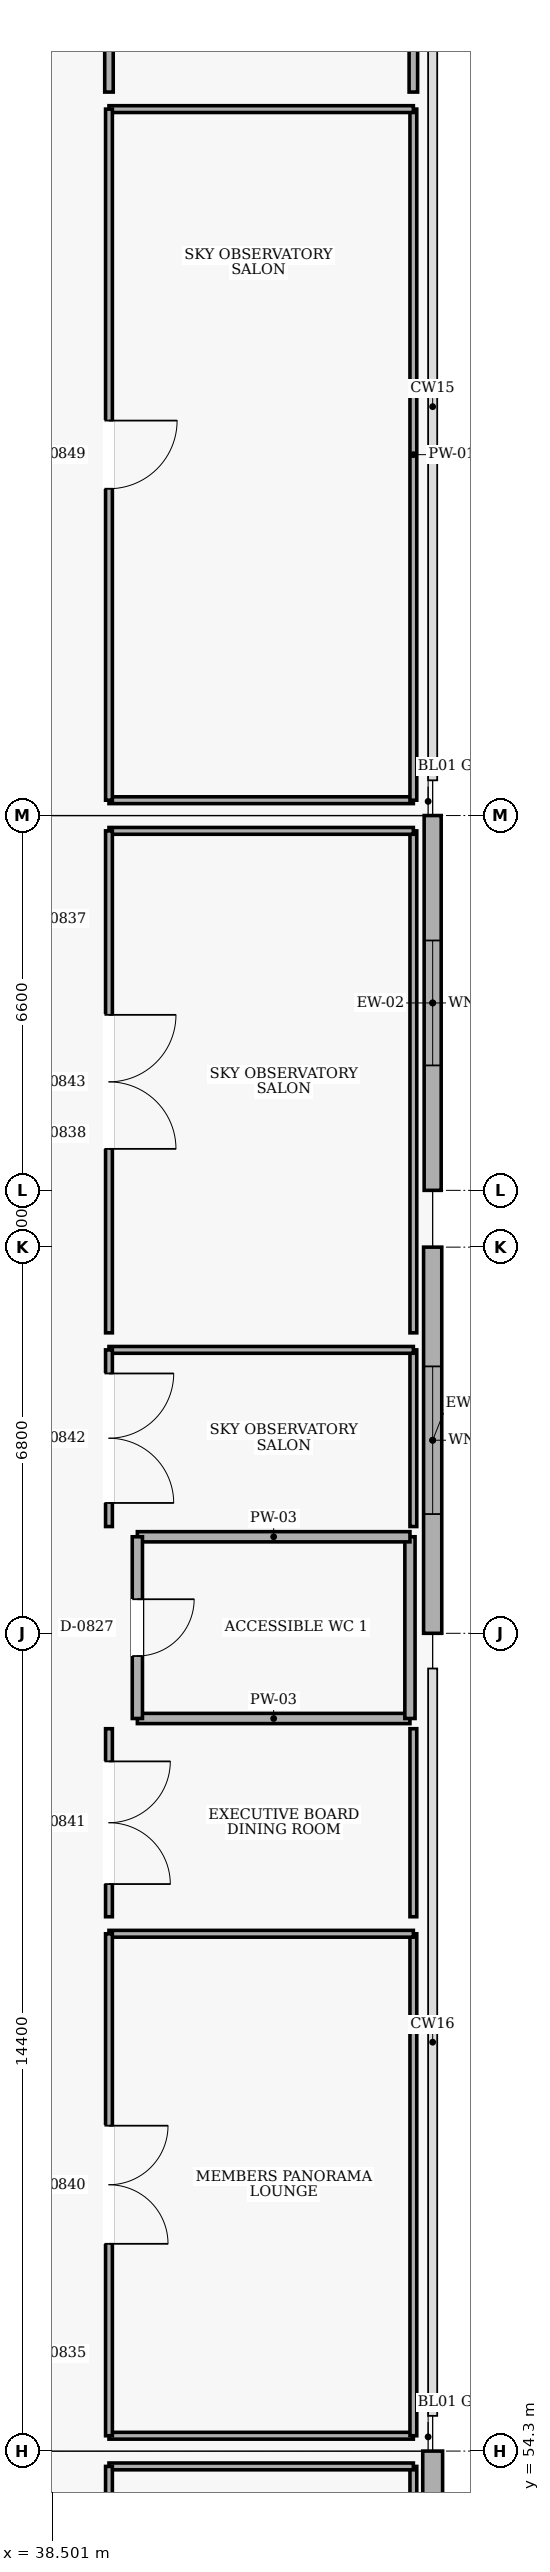
"""IFC4 building model, lengths in metres.
Left out: names, types, materials, properties, quantities, classifications, styles, units other than length and angle.
Written with IfcOpenShell. Run it as: python <this file> out.ifc"""

import sys

from ifc_helpers import new_model, si_unit, direction, frame, frame_2d, origin, place, context, subcontext, project, spatial, rectangle, extrude, element, fill, save


model = new_model("IFC4")
c1 = context("Model", 3, precision=1e-05, world=origin(), true_north=direction((0.0, 1.0)))
c2 = subcontext(c1, "Body", "Model", "MODEL_VIEW")
j1 = project(units=[si_unit("LENGTHUNIT", "METRE"), si_unit("PLANEANGLEUNIT", "RADIAN")], contexts=[c1])
p1 = place(None, origin())
s1 = spatial("IfcSite", under=j1, at=p1, CompositionType="ELEMENT")
p2 = place(p1, origin())
s2 = spatial("IfcBuilding", under=s1, at=p2, CompositionType="ELEMENT")
p3 = place(p2, frame((0.0, 0.0, 29.4)))
s3 = spatial("IfcBuildingStorey", under=s2, at=p3, CompositionType="ELEMENT", Elevation=29.4)
p4 = place(p3, frame((45.2, 83.1, 0.0), z_axis=(0.0, 0.0, 1.0), x_axis=(0.0, -1.0, 0.0)))
e1 = element("IfcWall", 1, at=p4, inside=s3, PredefinedType="SOLIDWALL", context=c2, shape_type="SweptSolid", body=[
    extrude(rectangle(XDim=6.6, YDim=0.3, at=frame_2d((3.3, 0.0))), origin(), (0.0, 0.0, 1.0), 4.48),
])
p5 = place(p4, frame((2.2, 0.0, 0.9)))
e2 = element("IfcOpeningElement", 2, at=p5, cuts=e1, PredefinedType="OPENING", context=c2, shape_type="SweptSolid", body=[
    extrude(rectangle(XDim=2.2, YDim=2.1, at=frame_2d((1.1, 1.05))), frame((0.0, 0.16, 0.0), z_axis=(0.0, -1.0, 0.0), x_axis=(1.0, 0.0, 0.0)), (0.0, 0.0, 1.0), 0.32),
])
p6 = place(p3, frame((45.2, 75.5, 0.0), z_axis=(0.0, 0.0, 1.0), x_axis=(0.0, -1.0, 0.0)))
e3 = element("IfcWall", 3, at=p6, inside=s3, PredefinedType="SOLIDWALL", context=c2, shape_type="SweptSolid", body=[
    extrude(rectangle(XDim=6.8, YDim=0.32, at=frame_2d((3.4, 0.0))), origin(), (0.0, 0.0, 1.0), 4.48),
])
p7 = place(p6, frame((2.1, 0.0, 0.9)))
e4 = element("IfcOpeningElement", 4, at=p7, cuts=e3, PredefinedType="OPENING", context=c2, shape_type="SweptSolid", body=[
    extrude(rectangle(XDim=2.6, YDim=2.1, at=frame_2d((1.3, 1.05))), frame((0.0, 0.17, 0.0), z_axis=(0.0, -1.0, 0.0), x_axis=(1.0, 0.0, 0.0)), (0.0, 0.0, 1.0), 0.34),
])
p8 = place(p3, frame((45.2, 54.3, 0.0), z_axis=(0.0, 0.0, 1.0), x_axis=(0.0, -1.0, 0.0)))
e5 = element("IfcWall", 5, at=p8, inside=s3, PredefinedType="SOLIDWALL", context=c2, shape_type="SweptSolid", body=[
    extrude(rectangle(XDim=7.2, YDim=0.35, at=frame_2d((3.6, 0.0))), origin(), (0.0, 0.0, 1.0), 4.48),
])
p9 = place(p8, frame((2.1, 0.0, 0.9)))
e6 = element("IfcOpeningElement", 6, at=p9, cuts=e5, PredefinedType="OPENING", context=c2, shape_type="SweptSolid", body=[
    extrude(rectangle(XDim=3.0, YDim=2.1, at=frame_2d((1.5, 1.05))), frame((0.0, 0.185, 0.0), z_axis=(0.0, -1.0, 0.0), x_axis=(1.0, 0.0, 0.0)), (0.0, 0.0, 1.0), 0.37),
])
p10 = place(p3, frame((40.0, 67.2, 0.0), z_axis=(0.0, 0.0, 1.0), x_axis=(1.0, 0.0, 0.0)))
e7 = element("IfcWall", 7, at=p10, inside=s3, PredefinedType="PARTITIONING", context=c2, shape_type="SweptSolid", body=[
    extrude(rectangle(XDim=4.8, YDim=0.18, at=frame_2d((2.4, 0.0))), origin(), (0.0, 0.0, 1.0), 4.5),
])
p11 = place(p3, frame((44.8, 67.2, 0.0), z_axis=(0.0, 0.0, 1.0), x_axis=(0.0, 1.0, 0.0)))
e8 = element("IfcWall", 8, at=p11, inside=s3, PredefinedType="PARTITIONING", context=c2, shape_type="SweptSolid", body=[
    extrude(rectangle(XDim=3.2, YDim=0.18, at=frame_2d((1.6, 0.0))), origin(), (0.0, 0.0, 1.0), 4.5),
])
p12 = place(p3, frame((44.8, 70.4, 0.0), z_axis=(0.0, 0.0, 1.0), x_axis=(-1.0, 0.0, 0.0)))
e9 = element("IfcWall", 9, at=p12, inside=s3, PredefinedType="PARTITIONING", context=c2, shape_type="SweptSolid", body=[
    extrude(rectangle(XDim=4.8, YDim=0.18, at=frame_2d((2.4, 0.0))), origin(), (0.0, 0.0, 1.0), 4.5),
])
p13 = place(p3, frame((40.0, 70.4, 0.0), z_axis=(0.0, 0.0, 1.0), x_axis=(0.0, -1.0, 0.0)))
e10 = element("IfcWall", 10, at=p13, inside=s3, PredefinedType="PARTITIONING", context=c2, shape_type="SweptSolid", body=[
    extrude(rectangle(XDim=3.2, YDim=0.18, at=frame_2d((1.6, 0.0))), origin(), (0.0, 0.0, 1.0), 4.5),
])
p14 = place(p13, frame((1.1, 0.0, 0.0)))
e11 = element("IfcOpeningElement", 11, at=p14, cuts=e10, PredefinedType="OPENING", context=c2, shape_type="SweptSolid", body=[
    extrude(rectangle(XDim=1.0, YDim=2.1, at=frame_2d((0.5, 1.05))), frame((0.0, 0.1, 0.0), z_axis=(0.0, -1.0, 0.0), x_axis=(1.0, 0.0, 0.0)), (0.0, 0.0, 1.0), 0.2),
])
p15 = place(p3, frame((44.86, 41.78, 0.0), z_axis=(0.0, 0.0, 1.0), x_axis=(0.0, 1.0, 0.0)))
e12 = element("IfcWall", 12, at=p15, inside=s3, PredefinedType="PARTITIONING", context=c2, shape_type="SweptSolid", body=[
    extrude(rectangle(XDim=12.25, YDim=0.12, at=frame_2d((6.125, 0.0))), origin(), (0.0, 0.0, 1.0), 4.5),
])
p16 = place(p3, frame((44.86, 54.03, 0.0), z_axis=(0.0, 0.0, 1.0), x_axis=(-1.0, 0.0, 0.0)))
e13 = element("IfcWall", 13, at=p16, inside=s3, PredefinedType="PARTITIONING", context=c2, shape_type="SweptSolid", body=[
    extrude(rectangle(XDim=5.36, YDim=0.12, at=frame_2d((2.68, 0.0))), origin(), (0.0, 0.0, 1.0), 4.5),
])
p17 = place(p3, frame((39.5, 54.03, 0.0), z_axis=(0.0, 0.0, 1.0), x_axis=(0.0, -1.0, 0.0)))
e14 = element("IfcWall", 14, at=p17, inside=s3, PredefinedType="PARTITIONING", context=c2, shape_type="SweptSolid", body=[
    extrude(rectangle(XDim=12.25, YDim=0.12, at=frame_2d((6.125, 0.0))), origin(), (0.0, 0.0, 1.0), 4.5),
])
p18 = place(p17, frame((5.425, 0.0, 0.0)))
e15 = element("IfcOpeningElement", 15, at=p18, cuts=e14, PredefinedType="OPENING", context=c2, shape_type="SweptSolid", body=[
    extrude(rectangle(XDim=1.4, YDim=2.2, at=frame_2d((0.7, 1.1))), frame((0.0, 0.07, 0.0), z_axis=(0.0, -1.0, 0.0), x_axis=(1.0, 0.0, 0.0)), (0.0, 0.0, 1.0), 0.14),
])
p19 = place(p3, frame((39.5, 54.57, 0.0), z_axis=(0.0, 0.0, 1.0), x_axis=(1.0, 0.0, 0.0)))
e16 = element("IfcWall", 16, at=p19, inside=s3, PredefinedType="PARTITIONING", context=c2, shape_type="SweptSolid", body=[
    extrude(rectangle(XDim=5.36, YDim=0.12, at=frame_2d((2.68, 0.0))), origin(), (0.0, 0.0, 1.0), 4.5),
])
p20 = place(p3, frame((44.86, 54.57, 0.0), z_axis=(0.0, 0.0, 1.0), x_axis=(0.0, 1.0, 0.0)))
e17 = element("IfcWall", 17, at=p20, inside=s3, PredefinedType="PARTITIONING", context=c2, shape_type="SweptSolid", body=[
    extrude(rectangle(XDim=8.839, YDim=0.12, at=frame_2d((4.419, 0.0))), origin(), (0.0, 0.0, 1.0), 4.5),
])
p21 = place(p3, frame((44.86, 63.409, 0.0), z_axis=(0.0, 0.0, 1.0), x_axis=(-1.0, 0.0, 0.0)))
e18 = element("IfcWall", 18, at=p21, inside=s3, PredefinedType="PARTITIONING", context=c2, shape_type="SweptSolid", body=[
    extrude(rectangle(XDim=5.36, YDim=0.12, at=frame_2d((2.68, 0.0))), origin(), (0.0, 0.0, 1.0), 4.5),
])
p22 = place(p3, frame((39.5, 63.409, 0.0), z_axis=(0.0, 0.0, 1.0), x_axis=(0.0, -1.0, 0.0)))
e19 = element("IfcWall", 19, at=p22, inside=s3, PredefinedType="PARTITIONING", context=c2, shape_type="SweptSolid", body=[
    extrude(rectangle(XDim=8.839, YDim=0.12, at=frame_2d((4.419, 0.0))), origin(), (0.0, 0.0, 1.0), 4.5),
])
p23 = place(p22, frame((3.38, 0.0, 0.0)))
e20 = element("IfcOpeningElement", 20, at=p23, cuts=e19, PredefinedType="OPENING", context=c2, shape_type="SweptSolid", body=[
    extrude(rectangle(XDim=2.08, YDim=2.35, at=frame_2d((1.04, 1.175))), frame((0.0, 0.07, 0.0), z_axis=(0.0, -1.0, 0.0), x_axis=(1.0, 0.0, 0.0)), (0.0, 0.0, 1.0), 0.14),
])
p24 = place(p3, frame((44.86, 63.709, 0.0), z_axis=(0.0, 0.0, 1.0), x_axis=(0.0, 1.0, 0.0)))
e21 = element("IfcWall", 21, at=p24, inside=s3, PredefinedType="PARTITIONING", context=c2, shape_type="SweptSolid", body=[
    extrude(rectangle(XDim=3.311, YDim=0.12, at=frame_2d((1.655, 0.0))), origin(), (0.0, 0.0, 1.0), 4.5),
])
p25 = place(p3, frame((39.5, 67.02, 0.0), z_axis=(0.0, 0.0, 1.0), x_axis=(0.0, -1.0, 0.0)))
e22 = element("IfcWall", 22, at=p25, inside=s3, PredefinedType="PARTITIONING", context=c2, shape_type="SweptSolid", body=[
    extrude(rectangle(XDim=3.311, YDim=0.12, at=frame_2d((1.655, 0.0))), origin(), (0.0, 0.0, 1.0), 4.5),
])
p26 = place(p25, frame((0.575, 0.0, 0.0)))
e23 = element("IfcOpeningElement", 23, at=p26, cuts=e22, PredefinedType="OPENING", context=c2, shape_type="SweptSolid", body=[
    extrude(rectangle(XDim=2.16, YDim=2.35, at=frame_2d((1.08, 1.175))), frame((0.0, 0.07, 0.0), z_axis=(0.0, -1.0, 0.0), x_axis=(1.0, 0.0, 0.0)), (0.0, 0.0, 1.0), 0.14),
])
p27 = place(p3, frame((44.86, 70.58, 0.0), z_axis=(0.0, 0.0, 1.0), x_axis=(0.0, 1.0, 0.0)))
e24 = element("IfcWall", 24, at=p27, inside=s3, PredefinedType="PARTITIONING", context=c2, shape_type="SweptSolid", body=[
    extrude(rectangle(XDim=3.111, YDim=0.12, at=frame_2d((1.555, 0.0))), origin(), (0.0, 0.0, 1.0), 4.5),
])
p28 = place(p3, frame((44.86, 73.691, 0.0), z_axis=(0.0, 0.0, 1.0), x_axis=(-1.0, 0.0, 0.0)))
e25 = element("IfcWall", 25, at=p28, inside=s3, PredefinedType="PARTITIONING", context=c2, shape_type="SweptSolid", body=[
    extrude(rectangle(XDim=5.36, YDim=0.12, at=frame_2d((2.68, 0.0))), origin(), (0.0, 0.0, 1.0), 4.5),
])
p29 = place(p3, frame((39.5, 73.691, 0.0), z_axis=(0.0, 0.0, 1.0), x_axis=(0.0, -1.0, 0.0)))
e26 = element("IfcWall", 26, at=p29, inside=s3, PredefinedType="PARTITIONING", context=c2, shape_type="SweptSolid", body=[
    extrude(rectangle(XDim=3.111, YDim=0.12, at=frame_2d((1.555, 0.0))), origin(), (0.0, 0.0, 1.0), 4.5),
])
p30 = place(p29, frame((0.415, 0.0, 0.0)))
e27 = element("IfcOpeningElement", 27, at=p30, cuts=e26, PredefinedType="OPENING", context=c2, shape_type="SweptSolid", body=[
    extrude(rectangle(XDim=2.28, YDim=2.4, at=frame_2d((1.14, 1.2))), frame((0.0, 0.07, 0.0), z_axis=(0.0, -1.0, 0.0), x_axis=(1.0, 0.0, 0.0)), (0.0, 0.0, 1.0), 0.14),
])
p31 = place(p3, frame((44.86, 73.991, 0.0), z_axis=(0.0, 0.0, 1.0), x_axis=(0.0, 1.0, 0.0)))
e28 = element("IfcWall", 28, at=p31, inside=s3, PredefinedType="PARTITIONING", context=c2, shape_type="SweptSolid", body=[
    extrude(rectangle(XDim=8.839, YDim=0.12, at=frame_2d((4.42, 0.0))), origin(), (0.0, 0.0, 1.0), 4.5),
])
p32 = place(p3, frame((44.86, 82.83, 0.0), z_axis=(0.0, 0.0, 1.0), x_axis=(-1.0, 0.0, 0.0)))
e29 = element("IfcWall", 29, at=p32, inside=s3, PredefinedType="PARTITIONING", context=c2, shape_type="SweptSolid", body=[
    extrude(rectangle(XDim=5.36, YDim=0.12, at=frame_2d((2.68, 0.0))), origin(), (0.0, 0.0, 1.0), 4.5),
])
p33 = place(p3, frame((39.5, 82.83, 0.0), z_axis=(0.0, 0.0, 1.0), x_axis=(0.0, -1.0, 0.0)))
e30 = element("IfcWall", 30, at=p33, inside=s3, PredefinedType="PARTITIONING", context=c2, shape_type="SweptSolid", body=[
    extrude(rectangle(XDim=8.839, YDim=0.12, at=frame_2d((4.42, 0.0))), origin(), (0.0, 0.0, 1.0), 4.5),
])
p34 = place(p33, frame((3.24, 0.0, 0.0)))
e31 = element("IfcOpeningElement", 31, at=p34, cuts=e30, PredefinedType="OPENING", context=c2, shape_type="SweptSolid", body=[
    extrude(rectangle(XDim=2.36, YDim=2.4, at=frame_2d((1.18, 1.2))), frame((0.0, 0.07, 0.0), z_axis=(0.0, -1.0, 0.0), x_axis=(1.0, 0.0, 0.0)), (0.0, 0.0, 1.0), 0.14),
])
p35 = place(p3, frame((39.5, 83.37, 0.0), z_axis=(0.0, 0.0, 1.0), x_axis=(1.0, 0.0, 0.0)))
e32 = element("IfcWall", 32, at=p35, inside=s3, PredefinedType="PARTITIONING", context=c2, shape_type="SweptSolid", body=[
    extrude(rectangle(XDim=5.36, YDim=0.12, at=frame_2d((2.68, 0.0))), origin(), (0.0, 0.0, 1.0), 4.5),
])
p36 = place(p3, frame((44.86, 83.37, 0.0), z_axis=(0.0, 0.0, 1.0), x_axis=(0.0, 1.0, 0.0)))
e33 = element("IfcWall", 33, at=p36, inside=s3, PredefinedType="PARTITIONING", context=c2, shape_type="SweptSolid", body=[
    extrude(rectangle(XDim=12.169, YDim=0.12, at=frame_2d((6.085, 0.0))), origin(), (0.0, 0.0, 1.0), 4.5),
])
p37 = place(p3, frame((44.86, 95.54, 0.0), z_axis=(0.0, 0.0, 1.0), x_axis=(-1.0, 0.0, 0.0)))
e34 = element("IfcWall", 34, at=p37, inside=s3, PredefinedType="PARTITIONING", context=c2, shape_type="SweptSolid", body=[
    extrude(rectangle(XDim=5.36, YDim=0.12, at=frame_2d((2.68, 0.0))), origin(), (0.0, 0.0, 1.0), 4.5),
])
p38 = place(p3, frame((39.5, 95.54, 0.0), z_axis=(0.0, 0.0, 1.0), x_axis=(0.0, -1.0, 0.0)))
e35 = element("IfcWall", 35, at=p38, inside=s3, PredefinedType="PARTITIONING", context=c2, shape_type="SweptSolid", body=[
    extrude(rectangle(XDim=12.169, YDim=0.12, at=frame_2d((6.085, 0.0))), origin(), (0.0, 0.0, 1.0), 4.5),
])
p39 = place(p38, frame((5.485, 0.0, 0.0)))
e36 = element("IfcOpeningElement", 36, at=p39, cuts=e35, PredefinedType="OPENING", context=c2, shape_type="SweptSolid", body=[
    extrude(rectangle(XDim=1.2, YDim=2.15, at=frame_2d((0.6, 1.075))), frame((0.0, 0.07, 0.0), z_axis=(0.0, -1.0, 0.0), x_axis=(1.0, 0.0, 0.0)), (0.0, 0.0, 1.0), 0.14),
])
p40 = place(p3, frame((44.86, 95.84, 0.0), z_axis=(0.0, 0.0, 1.0), x_axis=(0.0, 1.0, 0.0)))
e37 = element("IfcWall", 37, at=p40, inside=s3, PredefinedType="PARTITIONING", context=c2, shape_type="SweptSolid", body=[
    extrude(rectangle(XDim=15.57, YDim=0.15, at=frame_2d((7.785, 0.0))), origin(), (0.0, 0.0, 1.0), 4.5),
])
p41 = place(p3, frame((39.5, 111.41, 0.0), z_axis=(0.0, 0.0, 1.0), x_axis=(0.0, -1.0, 0.0)))
e38 = element("IfcWall", 38, at=p41, inside=s3, PredefinedType="PARTITIONING", context=c2, shape_type="SweptSolid", body=[
    extrude(rectangle(XDim=15.57, YDim=0.15, at=frame_2d((7.785, 0.0))), origin(), (0.0, 0.0, 1.0), 4.5),
])
p42 = place(p41, frame((7.135, 0.0, 0.0)))
e39 = element("IfcOpeningElement", 39, at=p42, cuts=e38, PredefinedType="OPENING", context=c2, shape_type="SweptSolid", body=[
    extrude(rectangle(XDim=1.3, YDim=2.2, at=frame_2d((0.65, 1.1))), frame((0.0, 0.085, 0.0), z_axis=(0.0, -1.0, 0.0), x_axis=(1.0, 0.0, 0.0)), (0.0, 0.0, 1.0), 0.17),
])
p43 = place(p5, origin())
e40 = element("IfcWindow", 40, at=p43, inside=s3, PartitioningType="SINGLE_PANEL", PredefinedType="WINDOW", context=c2, shape_type="SweptSolid", body=[
    extrude(rectangle(XDim=2.2, YDim=2.1, at=frame_2d((1.1, 1.05))), frame((0.0, 0.03, 0.0), z_axis=(0.0, -1.0, 0.0), x_axis=(1.0, 0.0, 0.0)), (0.0, 0.0, 1.0), 0.06),
])
fill(e2, e40)
p44 = place(p7, origin())
e41 = element("IfcWindow", 41, at=p44, inside=s3, PartitioningType="SINGLE_PANEL", PredefinedType="WINDOW", context=c2, shape_type="SweptSolid", body=[
    extrude(rectangle(XDim=2.6, YDim=2.1, at=frame_2d((1.3, 1.05))), frame((0.0, 0.03, 0.0), z_axis=(0.0, -1.0, 0.0), x_axis=(1.0, 0.0, 0.0)), (0.0, 0.0, 1.0), 0.06),
])
fill(e4, e41)
p45 = place(p14, origin())
e42 = element("IfcDoor", 42, at=p45, inside=s3, OperationType="SINGLE_SWING_LEFT", PredefinedType="DOOR", context=c2, shape_type="SweptSolid", body=[
    extrude(rectangle(XDim=1.0, YDim=2.1, at=frame_2d((0.5, 1.05))), frame((0.0, 0.025, 0.0), z_axis=(0.0, -1.0, 0.0), x_axis=(1.0, 0.0, 0.0)), (0.0, 0.0, 1.0), 0.05),
])
fill(e11, e42)
p46 = place(p23, origin())
e43 = element("IfcDoor", 43, at=p46, inside=s3, OperationType="DOUBLE_DOOR_SINGLE_SWING", PredefinedType="DOOR", context=c2, shape_type="SweptSolid", body=[
    extrude(rectangle(XDim=2.08, YDim=2.35, at=frame_2d((1.04, 1.175))), frame((0.0, 0.025, 0.0), z_axis=(0.0, -1.0, 0.0), x_axis=(1.0, 0.0, 0.0)), (0.0, 0.0, 1.0), 0.05),
])
fill(e20, e43)
p47 = place(p26, origin())
e44 = element("IfcDoor", 44, at=p47, inside=s3, OperationType="DOUBLE_DOOR_SINGLE_SWING", PredefinedType="DOOR", context=c2, shape_type="SweptSolid", body=[
    extrude(rectangle(XDim=2.16, YDim=2.35, at=frame_2d((1.08, 1.175))), frame((0.0, 0.025, 0.0), z_axis=(0.0, -1.0, 0.0), x_axis=(1.0, 0.0, 0.0)), (0.0, 0.0, 1.0), 0.05),
])
fill(e23, e44)
p48 = place(p30, origin())
e45 = element("IfcDoor", 45, at=p48, inside=s3, OperationType="DOUBLE_DOOR_SINGLE_SWING", PredefinedType="DOOR", context=c2, shape_type="SweptSolid", body=[
    extrude(rectangle(XDim=2.28, YDim=2.4, at=frame_2d((1.14, 1.2))), frame((0.0, 0.025, 0.0), z_axis=(0.0, -1.0, 0.0), x_axis=(1.0, 0.0, 0.0)), (0.0, 0.0, 1.0), 0.05),
])
fill(e27, e45)
p49 = place(p34, origin())
e46 = element("IfcDoor", 46, at=p49, inside=s3, OperationType="DOUBLE_DOOR_SINGLE_SWING", PredefinedType="DOOR", context=c2, shape_type="SweptSolid", body=[
    extrude(rectangle(XDim=2.36, YDim=2.4, at=frame_2d((1.18, 1.2))), frame((0.0, 0.025, 0.0), z_axis=(0.0, -1.0, 0.0), x_axis=(1.0, 0.0, 0.0)), (0.0, 0.0, 1.0), 0.05),
])
fill(e31, e46)
p50 = place(p39, origin())
e47 = element("IfcDoor", 47, at=p50, inside=s3, OperationType="SINGLE_SWING_LEFT", PredefinedType="DOOR", context=c2, shape_type="SweptSolid", body=[
    extrude(rectangle(XDim=1.2, YDim=2.15, at=frame_2d((0.6, 1.075))), frame((0.0, 0.025, 0.0), z_axis=(0.0, -1.0, 0.0), x_axis=(1.0, 0.0, 0.0)), (0.0, 0.0, 1.0), 0.05),
])
fill(e36, e47)
save(model, sys.argv[1])
